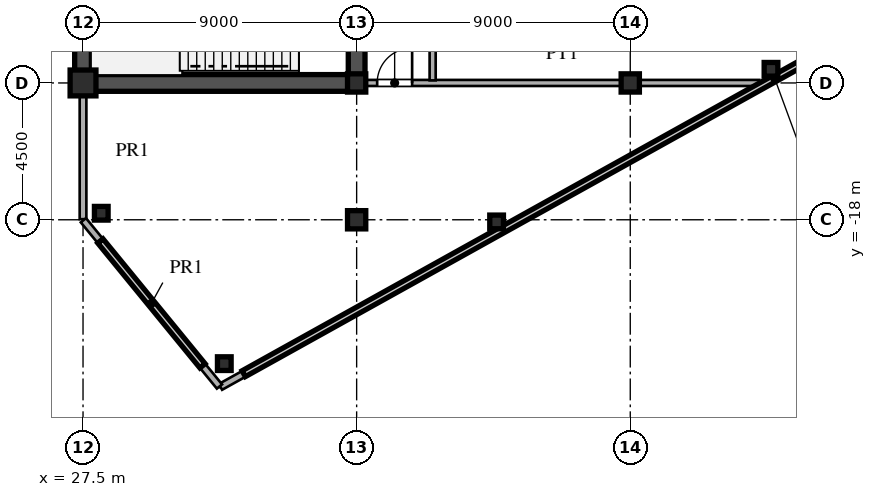
"""IFC4 building model, lengths in metres.
Left out: names, types, materials, properties, quantities, classifications, styles, units other than length and angle.
Written with IfcOpenShell. Run it as: python <this file> out.ifc"""

import sys

from ifc_helpers import new_model, si_unit, direction, frame, frame_2d, origin, origin_2d, place, context, subcontext, project, spatial, rectangle, hollow_rectangle, i_section, extrude, source, transform, mapped, element, fill, save


model = new_model("IFC4")
c1 = context("Model", 3, precision=1e-05, world=origin(), true_north=direction((0.0, 1.0)))
c2 = subcontext(c1, "Body", "Model", "MODEL_VIEW")
j1 = project(units=[si_unit("LENGTHUNIT", "METRE"), si_unit("PLANEANGLEUNIT", "RADIAN")], contexts=[c1])
p1 = place(None, origin())
s1 = spatial("IfcSite", under=j1, at=p1, CompositionType="ELEMENT")
p2 = place(p1, origin())
s2 = spatial("IfcBuilding", under=s1, at=p2, CompositionType="ELEMENT")
p3 = place(p2, frame((0.0, 0.0, 162.0)))
s3 = spatial("IfcBuildingStorey", under=s2, at=p3, CompositionType="ELEMENT", Elevation=162.0)
m1 = source(origin(), c2, "Body", "SweptSolid", [
    extrude(hollow_rectangle(XDim=0.85, YDim=0.85, WallThickness=0.036, at=origin_2d()), origin(), (0.0, 0.0, 1.0), 5.1),
])
p4 = place(p3, frame((27.5, -13.5, 0.0), z_axis=(0.0, 0.0, 1.0), x_axis=(1.0, 0.0, 0.0)))
e1 = element("IfcColumn", 1, at=p4, inside=s3, PredefinedType="COLUMN", context=c2, shape_type="MappedRepresentation", body=[
    mapped(m1, transform((0.0, 0.0, 0.0), scale=1.0)),
])
m2 = source(origin(), c2, "Body", "SweptSolid", [
    extrude(i_section(OverallWidth=0.6, OverallDepth=0.6, WebThickness=0.025, FlangeThickness=0.04, at=origin_2d()), origin(), (0.0, 0.0, 1.0), 5.1),
])
for number, where, z_axis, x_axis in (
    (2, (36.5, -18.0, 0.0), (0.0, 0.0, 1.0), (1.0, 0.0, 0.0)),
    (3, (36.5, -13.5, 0.0), (0.0, 0.0, 1.0), (1.0, 0.0, 0.0)),
    (4, (45.5, -13.5, 0.0), (0.0, 0.0, 1.0), (1.0, 0.0, 0.0)),
):
    element("IfcColumn", number, at=place(p3, frame(where, z_axis=z_axis, x_axis=x_axis)), inside=s3, PredefinedType="COLUMN", context=c2, shape_type="MappedRepresentation", body=[
        mapped(m2, transform((0.0, 0.0, 0.0), scale=1.0)),
    ])
m3 = source(origin(), c2, "Body", "SweptSolid", [
    extrude(hollow_rectangle(XDim=0.45, YDim=0.45, WallThickness=0.018, at=origin_2d()), origin(), (0.0, 0.0, 1.0), 5.1),
])
for number, where, z_axis, x_axis in (
    (5, (32.147, -22.732, 0.0), (0.0, 0.0, 1.0), (1.0, 0.0, 0.0)),
    (6, (28.1, -17.786, 0.0), (0.0, 0.0, 1.0), (1.0, 0.0, 0.0)),
    (7, (41.104, -18.071, 0.0), (0.0, 0.0, 1.0), (1.0, 0.0, 0.0)),
    (8, (50.129, -13.051, 0.0), (0.0, 0.0, 1.0), (1.0, 0.0, 0.0)),
):
    element("IfcColumn", number, at=place(p3, frame(where, z_axis=z_axis, x_axis=x_axis)), inside=s3, PredefinedType="COLUMN", context=c2, shape_type="MappedRepresentation", body=[
        mapped(m3, transform((0.0, 0.0, 0.0), scale=1.0)),
    ])
p5 = place(p3, frame((32.018, -23.49, 0.0), z_axis=(0.0, 0.0, 1.0), x_axis=(0.873930586172, 0.486050748947, 0.0)))
e9 = element("IfcWall", 9, at=p5, inside=s3, PredefinedType="PARAPET", context=c2, shape_type="SweptSolid", body=[
    extrude(rectangle(XDim=41.725, YDim=0.22, at=frame_2d((20.863, 0.0))), origin(), (0.0, 0.0, 1.0), 1.25),
])
p6 = place(p3, frame((27.5, -17.98, 0.0), z_axis=(0.0, 0.0, 1.0), x_axis=(0.0, 1.0, 0.0)))
e10 = element("IfcWall", 10, at=p6, inside=s3, PredefinedType="PARAPET", context=c2, shape_type="SweptSolid", body=[
    extrude(rectangle(XDim=4.46, YDim=0.22, at=frame_2d((2.23, 0.0))), origin(), (0.0, 0.0, 1.0), 1.25),
])
p7 = place(p3, frame((27.513, -18.015, 0.0), z_axis=(0.0, 0.0, 1.0), x_axis=(0.633218976113, -0.773972692213, 0.0)))
e11 = element("IfcWall", 11, at=p7, inside=s3, PredefinedType="PARAPET", context=c2, shape_type="SweptSolid", body=[
    extrude(rectangle(XDim=7.066, YDim=0.22, at=frame_2d((3.533, 0.0))), origin(), (0.0, 0.0, 1.0), 1.25),
])
p8 = place(p3, frame((27.5, -13.5, 0.0), z_axis=(0.0, 0.0, 1.0), x_axis=(0.0, 1.0, 0.0)))
e12 = element("IfcWall", 12, at=p8, inside=s3, PredefinedType="SHEAR", context=c2, shape_type="SweptSolid", body=[
    extrude(rectangle(XDim=12.2, YDim=0.55, at=frame_2d((6.1, 0.0))), origin(), (0.0, 0.0, 1.0), 4.88),
])
p9 = place(p3, frame((27.5, -13.5, 0.0), z_axis=(0.0, 0.0, 1.0), x_axis=(1.0, 0.0, 0.0)))
e13 = element("IfcWall", 13, at=p9, inside=s3, PredefinedType="SHEAR", context=c2, shape_type="SweptSolid", body=[
    extrude(rectangle(XDim=9.0, YDim=0.55, at=frame_2d((4.5, 0.0))), origin(), (0.0, 0.0, 1.0), 4.88),
])
p10 = place(p3, frame((36.5, -13.65, 0.0), z_axis=(0.0, 0.0, 1.0), x_axis=(0.0, 1.0, 0.0)))
e14 = element("IfcWall", 14, at=p10, inside=s3, PredefinedType="SHEAR", context=c2, shape_type="SweptSolid", body=[
    extrude(rectangle(XDim=7.15, YDim=0.55, at=frame_2d((3.575, 0.0))), origin(), (0.0, 0.0, 1.0), 4.88),
])
p11 = place(p10, frame((4.675, 0.0, 0.0)))
e15 = element("IfcOpeningElement", 15, at=p11, cuts=e14, PredefinedType="OPENING", context=c2, shape_type="SweptSolid", body=[
    extrude(rectangle(XDim=1.15, YDim=2.2, at=frame_2d((0.575, 1.1))), frame((0.0, 0.285, 0.0), z_axis=(0.0, -1.0, 0.0), x_axis=(1.0, 0.0, 0.0)), (0.0, 0.0, 1.0), 0.57),
])
p12 = place(p3, frame((36.78, -13.5, 0.0), z_axis=(0.0, 0.0, 1.0), x_axis=(1.0, 0.0, 0.0)))
e16 = element("IfcWall", 16, at=p12, inside=s3, PredefinedType="PARTITIONING", context=c2, shape_type="SweptSolid", body=[
    extrude(rectangle(XDim=10.807, YDim=0.2, at=frame_2d((5.404, 0.0))), origin(), (0.0, 0.0, 1.0), 4.28),
])
p13 = place(p12, frame((0.395, 0.0, 0.0)))
e17 = element("IfcOpeningElement", 17, at=p13, cuts=e16, PredefinedType="OPENING", context=c2, shape_type="SweptSolid", body=[
    extrude(rectangle(XDim=1.15, YDim=2.2, at=frame_2d((0.575, 1.1))), frame((0.0, 0.11, 0.0), z_axis=(0.0, -1.0, 0.0), x_axis=(1.0, 0.0, 0.0)), (0.0, 0.0, 1.0), 0.22),
])
p14 = place(p3, frame((47.587, -13.5, 0.0), z_axis=(0.0, 0.0, 1.0), x_axis=(1.0, 0.0, 0.0)))
e18 = element("IfcWall", 18, at=p14, inside=s3, PredefinedType="PARTITIONING", context=c2, shape_type="SweptSolid", body=[
    extrude(rectangle(XDim=2.156, YDim=0.2, at=frame_2d((1.078, 0.0))), origin(), (0.0, 0.0, 1.0), 4.88),
])
p15 = place(p3, frame((39.0, -13.415, 0.0), z_axis=(0.0, 0.0, 1.0), x_axis=(0.0, 1.0, 0.0)))
e19 = element("IfcWall", 19, at=p15, inside=s3, PredefinedType="PARTITIONING", context=c2, shape_type="SweptSolid", body=[
    extrude(rectangle(XDim=26.83, YDim=0.2, at=frame_2d((13.415, 0.0))), origin(), (0.0, 0.0, 1.0), 4.88),
])
p16 = place(p15, frame((3.29, 0.0, 0.0)))
e20 = element("IfcOpeningElement", 20, at=p16, cuts=e19, PredefinedType="OPENING", context=c2, shape_type="SweptSolid", body=[
    extrude(rectangle(XDim=1.15, YDim=2.2, at=frame_2d((0.575, 1.1))), frame((0.0, 0.11, 0.0), z_axis=(0.0, -1.0, 0.0), x_axis=(1.0, 0.0, 0.0)), (0.0, 0.0, 1.0), 0.22),
])
p17 = place(p15, frame((9.84, 0.0, 0.0)))
e21 = element("IfcOpeningElement", 21, at=p17, cuts=e19, PredefinedType="OPENING", context=c2, shape_type="SweptSolid", body=[
    extrude(rectangle(XDim=1.15, YDim=2.2, at=frame_2d((0.575, 1.1))), frame((0.0, 0.11, 0.0), z_axis=(0.0, -1.0, 0.0), x_axis=(1.0, 0.0, 0.0)), (0.0, 0.0, 1.0), 0.22),
])
p18 = place(p15, frame((16.09, 0.0, 0.0)))
e22 = element("IfcOpeningElement", 22, at=p18, cuts=e19, PredefinedType="OPENING", context=c2, shape_type="SweptSolid", body=[
    extrude(rectangle(XDim=1.15, YDim=2.2, at=frame_2d((0.575, 1.1))), frame((0.0, 0.11, 0.0), z_axis=(0.0, -1.0, 0.0), x_axis=(1.0, 0.0, 0.0)), (0.0, 0.0, 1.0), 0.22),
])
p19 = place(p15, frame((22.64, 0.0, 0.0)))
e23 = element("IfcOpeningElement", 23, at=p19, cuts=e19, PredefinedType="OPENING", context=c2, shape_type="SweptSolid", body=[
    extrude(rectangle(XDim=1.15, YDim=2.2, at=frame_2d((0.575, 1.1))), frame((0.0, 0.11, 0.0), z_axis=(0.0, -1.0, 0.0), x_axis=(1.0, 0.0, 0.0)), (0.0, 0.0, 1.0), 0.22),
])
m4 = source(origin(), c2, "Body", "SweptSolid", [
    extrude(rectangle(XDim=1.15, YDim=2.2, at=frame_2d((0.575, 1.1))), frame((0.0, 0.025, 0.0), z_axis=(0.0, -1.0, 0.0), x_axis=(1.0, 0.0, 0.0)), (0.0, 0.0, 1.0), 0.05),
])
p20 = place(p13, origin())
e24 = element("IfcDoor", 24, at=p20, inside=s3, OperationType="SINGLE_SWING_RIGHT", PredefinedType="DOOR", context=c2, shape_type="MappedRepresentation", body=[
    mapped(m4, transform((0.0, 0.0, 0.0), scale=1.0)),
])
fill(e17, e24)
save(model, sys.argv[1])
